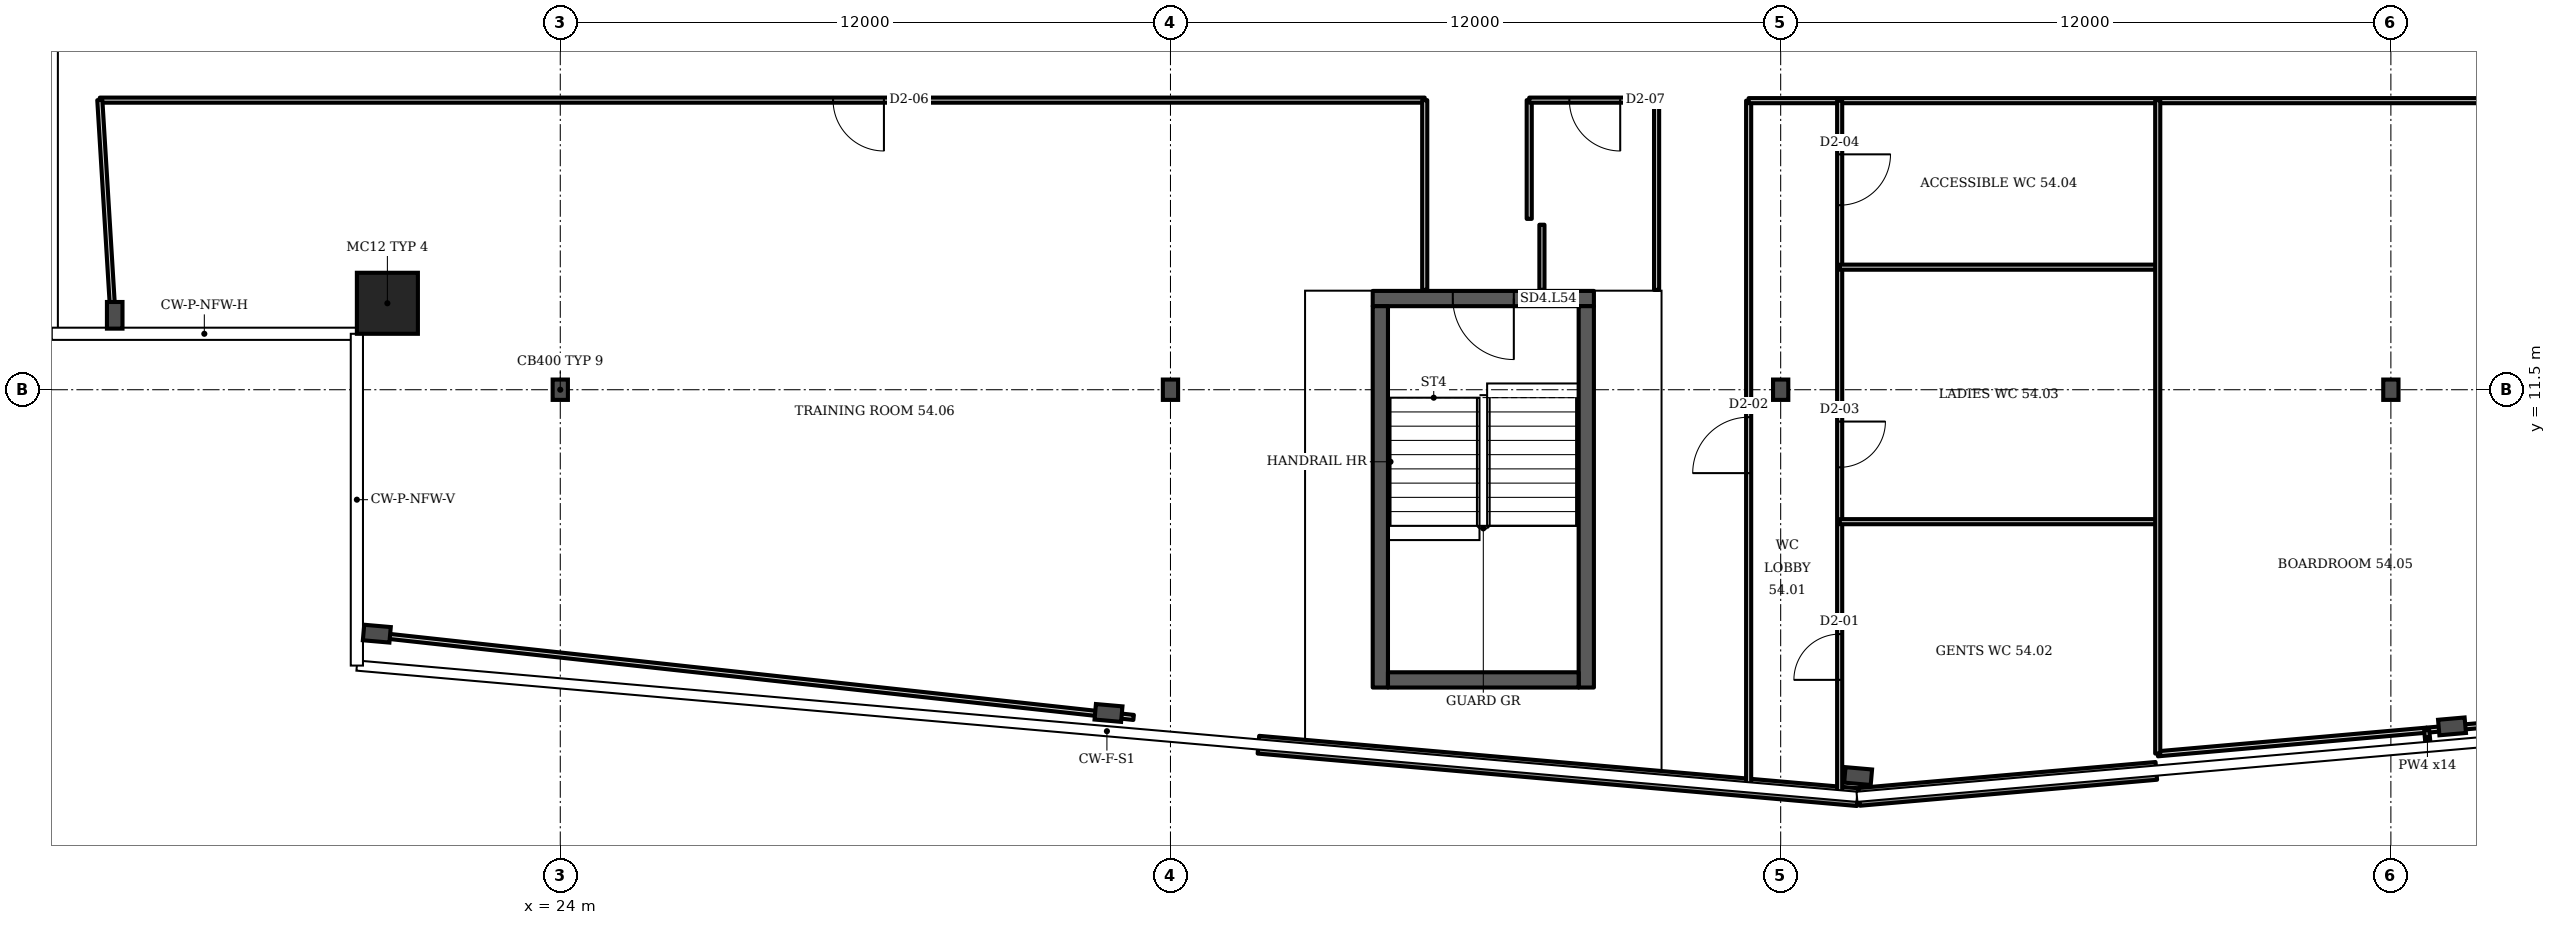
"""IFC4 building model, lengths in metres.
Left out: names, types, materials, properties, quantities, classifications, styles, units other than length and angle.
Written with IfcOpenShell. Run it as: python <this file> out.ifc"""

import sys

from ifc_helpers import new_model, si_unit, direction, frame, frame_2d, origin, origin_2d, place, context, subcontext, project, spatial, rectangle, i_section, extrude, element, fill, save


model = new_model("IFC4")
c1 = context("Model", 3, precision=1e-05, world=origin(), true_north=direction((0.0, 1.0)))
c2 = subcontext(c1, "Body", "Model", "MODEL_VIEW")
j1 = project(units=[si_unit("LENGTHUNIT", "METRE"), si_unit("PLANEANGLEUNIT", "RADIAN")], contexts=[c1])
p1 = place(None, origin())
s1 = spatial("IfcSite", under=j1, at=p1, CompositionType="ELEMENT")
p2 = place(p1, origin())
s2 = spatial("IfcBuilding", under=s1, at=p2, CompositionType="ELEMENT")
p3 = place(p2, frame((0.0, 0.0, 217.9)))
s3 = spatial("IfcBuildingStorey", under=s2, at=p3, CompositionType="ELEMENT", Elevation=217.9)
p4 = place(p3, frame((20.6, 13.2, 0.0), z_axis=(0.0, 0.0, 1.0), x_axis=(1.0, 0.0, 0.0)))
e1 = element("IfcColumn", 1, at=p4, inside=s3, PredefinedType="COLUMN", context=c2, shape_type="SweptSolid", body=[
    extrude(rectangle(XDim=1.2, YDim=1.2, at=origin_2d()), origin(), (0.0, 0.0, 1.0), 3.6),
])
for number, where, z_axis, x_axis in (
    (2, (20.392, 6.703, 0.0), (0.0, 0.0, 1.0), (-0.087, -0.996, 0.0)),
    (3, (34.781, 5.143, 0.0), (0.0, 0.0, 1.0), (-0.087, -0.996, 0.0)),
    (4, (49.523, 3.902, 0.0), (0.0, 0.0, 1.0), (-0.087, -0.996, 0.0)),
    (5, (61.202, 4.879, 0.0), (0.0, 0.0, 1.0), (0.087, -0.996, 0.0)),
    (6, (15.238, 12.963, 0.0), (0.0, 0.0, 1.0), (-1.0, 0.0, 0.0)),
):
    element("IfcColumn", number, at=place(p3, frame(where, z_axis=z_axis, x_axis=x_axis)), inside=s3, PredefinedType="COLUMN", context=c2, shape_type="SweptSolid", body=[
        extrude(i_section(OverallWidth=0.306, OverallDepth=0.524, WebThickness=0.021, FlangeThickness=0.04, FilletRadius=0.027, at=origin_2d()), origin(), (0.0, 0.0, 1.0), 3.6),
    ])
for number, where, z_axis, x_axis in (
    (7, (24.0, 11.5, 0.0), (0.0, 0.0, 1.0), (1.0, 0.0, 0.0)),
    (8, (36.0, 11.5, 0.0), (0.0, 0.0, 1.0), (1.0, 0.0, 0.0)),
    (9, (48.0, 11.5, 0.0), (0.0, 0.0, 1.0), (1.0, 0.0, 0.0)),
    (10, (60.0, 11.5, 0.0), (0.0, 0.0, 1.0), (1.0, 0.0, 0.0)),
):
    element("IfcColumn", number, at=place(p3, frame(where, z_axis=z_axis, x_axis=x_axis)), inside=s3, PredefinedType="COLUMN", context=c2, shape_type="SweptSolid", body=[
        extrude(i_section(OverallWidth=0.3, OverallDepth=0.4, WebThickness=0.013, FlangeThickness=0.024, FilletRadius=0.027, at=origin_2d()), origin(), (0.0, 0.0, 1.0), 3.6),
    ])
p5 = place(p3, frame((37.729, 4.519, 0.0), z_axis=(0.0, 0.0, 1.0), x_axis=(0.99619, -0.087167, 0.0)))
e11 = element("IfcWall", 11, at=p5, inside=s3, PredefinedType="SOLIDWALL", context=c2, shape_type="SweptSolid", body=[
    extrude(rectangle(XDim=11.831, YDim=0.35, at=frame_2d((5.915, 0.0))), origin(), (0.0, 0.0, 1.0), 1.0),
])
p6 = place(p3, frame((49.545, 3.493, 0.0), z_axis=(0.0, 0.0, 1.0), x_axis=(0.996196, 0.087138, 0.0)))
e12 = element("IfcWall", 12, at=p6, inside=s3, PredefinedType="SOLIDWALL", context=c2, shape_type="SweptSolid", body=[
    extrude(rectangle(XDim=5.864, YDim=0.35, at=frame_2d((2.932, 0.0))), origin(), (0.0, 0.0, 1.0), 1.0),
])
p7 = place(p3, frame((39.977, 13.293, 0.0), z_axis=(0.0, 0.0, 1.0), x_axis=(1.0, 0.0, 0.0)))
e13 = element("IfcWall", 13, at=p7, inside=s3, PredefinedType="SHEAR", context=c2, shape_type="SweptSolid", body=[
    extrude(rectangle(XDim=4.35, YDim=0.3, at=frame_2d((2.175, 0.0))), origin(), (0.0, 0.0, 1.0), 3.2),
])
p8 = place(p7, frame((1.575, 0.0, 0.0)))
e14 = element("IfcOpeningElement", 14, at=p8, cuts=e13, PredefinedType="OPENING", context=c2, shape_type="SweptSolid", body=[
    extrude(rectangle(XDim=1.2, YDim=2.1, at=frame_2d((0.6, 1.05))), frame((0.0, 0.16, 0.0), z_axis=(0.0, -1.0, 0.0), x_axis=(1.0, 0.0, 0.0)), (0.0, 0.0, 1.0), 0.32),
])
p9 = place(p3, frame((14.945, 17.195, 0.0), z_axis=(0.0, 0.0, 1.0), x_axis=(1.0, 0.0, 0.0)))
e15 = element("IfcWall", 15, at=p9, inside=s3, PredefinedType="PARTITIONING", context=c2, shape_type="SweptSolid", body=[
    extrude(rectangle(XDim=26.055, YDim=0.1, at=frame_2d((13.027, 0.0))), origin(), (0.0, 0.0, 1.0), 3.2),
])
p10 = place(p9, frame((14.42, 0.0, 0.0)))
e16 = element("IfcOpeningElement", 16, at=p10, cuts=e15, PredefinedType="OPENING", context=c2, shape_type="SweptSolid", body=[
    extrude(rectangle(XDim=1.0, YDim=2.1, at=frame_2d((0.5, 1.05))), frame((0.0, 0.06, 0.0), z_axis=(0.0, -1.0, 0.0), x_axis=(1.0, 0.0, 0.0)), (0.0, 0.0, 1.0), 0.12),
])
p11 = place(p3, frame((15.224, 12.62, 0.0), z_axis=(0.0, 0.0, 1.0), x_axis=(-0.060903, 0.99814, 0.0)))
e17 = element("IfcWall", 17, at=p11, inside=s3, PredefinedType="PARTITIONING", context=c2, shape_type="SweptSolid", body=[
    extrude(rectangle(XDim=4.586, YDim=0.1, at=frame_2d((2.293, 0.0))), origin(), (0.0, 0.0, 1.0), 3.2),
])
p12 = place(p3, frame((35.275, 5.055, 0.0), z_axis=(0.0, 0.0, 1.0), x_axis=(-0.994128, 0.108228, 0.0)))
e18 = element("IfcWall", 18, at=p12, inside=s3, PredefinedType="PARTITIONING", context=c2, shape_type="SweptSolid", body=[
    extrude(rectangle(XDim=15.335, YDim=0.1, at=frame_2d((7.667, 0.0))), origin(), (0.0, 0.0, 1.0), 2.58),
])
p13 = place(p3, frame((41.0, 13.463, 0.0), z_axis=(0.0, 0.0, 1.0), x_axis=(0.0, 1.0, 0.0)))
e19 = element("IfcWall", 19, at=p13, inside=s3, PredefinedType="PARTITIONING", context=c2, shape_type="SweptSolid", body=[
    extrude(rectangle(XDim=3.732, YDim=0.1, at=frame_2d((1.866, 0.0))), origin(), (0.0, 0.0, 1.0), 3.2),
])
p14 = place(p3, frame((43.055, 14.86, 0.0), z_axis=(0.0, 0.0, 1.0), x_axis=(0.0, 1.0, 0.0)))
e20 = element("IfcWall", 20, at=p14, inside=s3, PredefinedType="PARTITIONING", context=c2, shape_type="SweptSolid", body=[
    extrude(rectangle(XDim=2.335, YDim=0.1, at=frame_2d((1.167, 0.0))), origin(), (0.0, 0.0, 1.0), 3.2),
])
p15 = place(p3, frame((43.055, 17.195, 0.0), z_axis=(0.0, 0.0, 1.0), x_axis=(1.0, 0.0, 0.0)))
e21 = element("IfcWall", 21, at=p15, inside=s3, PredefinedType="PARTITIONING", context=c2, shape_type="SweptSolid", body=[
    extrude(rectangle(XDim=2.505, YDim=0.1, at=frame_2d((1.252, 0.0))), origin(), (0.0, 0.0, 1.0), 3.2),
])
p16 = place(p15, frame((0.789, 0.0, 0.0)))
e22 = element("IfcOpeningElement", 22, at=p16, cuts=e21, PredefinedType="OPENING", context=c2, shape_type="SweptSolid", body=[
    extrude(rectangle(XDim=1.0, YDim=2.1, at=frame_2d((0.5, 1.05))), frame((0.0, 0.06, 0.0), z_axis=(0.0, -1.0, 0.0), x_axis=(1.0, 0.0, 0.0)), (0.0, 0.0, 1.0), 0.12),
])
p17 = place(p3, frame((43.305, 13.463, 0.0), z_axis=(0.0, 0.0, 1.0), x_axis=(0.0, 1.0, 0.0)))
e23 = element("IfcWall", 23, at=p17, inside=s3, PredefinedType="PARTITIONING", context=c2, shape_type="SweptSolid", body=[
    extrude(rectangle(XDim=1.282, YDim=0.1, at=frame_2d((0.641, 0.0))), origin(), (0.0, 0.0, 1.0), 3.2),
])
p18 = place(p3, frame((45.56, 13.463, 0.0), z_axis=(0.0, 0.0, 1.0), x_axis=(0.0, 1.0, 0.0)))
e24 = element("IfcWall", 24, at=p18, inside=s3, PredefinedType="PARTITIONING", context=c2, shape_type="SweptSolid", body=[
    extrude(rectangle(XDim=3.732, YDim=0.1, at=frame_2d((1.866, 0.0))), origin(), (0.0, 0.0, 1.0), 3.2),
])
p19 = place(p3, frame((47.37, 3.701, 0.0), z_axis=(0.0, 0.0, 1.0), x_axis=(0.0, 1.0, 0.0)))
e25 = element("IfcWall", 25, at=p19, inside=s3, PredefinedType="PARTITIONING", context=c2, shape_type="SweptSolid", body=[
    extrude(rectangle(XDim=13.484, YDim=0.1, at=frame_2d((6.742, 0.0))), origin(), (0.0, 0.0, 1.0), 2.58),
])
p20 = place(p19, frame((6.159, 0.0, 0.0)))
e26 = element("IfcOpeningElement", 26, at=p20, cuts=e25, PredefinedType="OPENING", context=c2, shape_type="SweptSolid", body=[
    extrude(rectangle(XDim=1.1, YDim=2.1, at=frame_2d((0.55, 1.05))), frame((0.0, 0.06, 0.0), z_axis=(0.0, -1.0, 0.0), x_axis=(1.0, 0.0, 0.0)), (0.0, 0.0, 1.0), 0.12),
])
p21 = place(p3, frame((47.37, 17.185, 0.0), z_axis=(0.0, 0.0, 1.0), x_axis=(1.0, 0.0, 0.0)))
e27 = element("IfcWall", 27, at=p21, inside=s3, PredefinedType="PARTITIONING", context=c2, shape_type="SweptSolid", body=[
    extrude(rectangle(XDim=17.75, YDim=0.1, at=frame_2d((8.875, 0.0))), origin(), (0.0, 0.0, 1.0), 3.2),
])
p22 = place(p3, frame((49.16, 3.544, 0.0), z_axis=(0.0, 0.0, 1.0), x_axis=(0.0, 1.0, 0.0)))
e28 = element("IfcWall", 28, at=p22, inside=s3, PredefinedType="PARTITIONING", context=c2, shape_type="SweptSolid", body=[
    extrude(rectangle(XDim=13.641, YDim=0.1, at=frame_2d((6.821, 0.0))), origin(), (0.0, 0.0, 1.0), 2.58),
])
p23 = place(p22, frame((2.25, 0.0, 0.0)))
e29 = element("IfcOpeningElement", 29, at=p23, cuts=e28, PredefinedType="OPENING", context=c2, shape_type="SweptSolid", body=[
    extrude(rectangle(XDim=0.9, YDim=2.1, at=frame_2d((0.45, 1.05))), frame((0.0, 0.06, 0.0), z_axis=(0.0, -1.0, 0.0), x_axis=(1.0, 0.0, 0.0)), (0.0, 0.0, 1.0), 0.12),
])
p24 = place(p22, frame((6.43, 0.0, 0.0)))
e30 = element("IfcOpeningElement", 30, at=p24, cuts=e28, PredefinedType="OPENING", context=c2, shape_type="SweptSolid", body=[
    extrude(rectangle(XDim=0.9, YDim=2.1, at=frame_2d((0.45, 1.05))), frame((0.0, 0.06, 0.0), z_axis=(0.0, -1.0, 0.0), x_axis=(1.0, 0.0, 0.0)), (0.0, 0.0, 1.0), 0.12),
])
p25 = place(p22, frame((11.585, 0.0, 0.0)))
e31 = element("IfcOpeningElement", 31, at=p25, cuts=e28, PredefinedType="OPENING", context=c2, shape_type="SweptSolid", body=[
    extrude(rectangle(XDim=1.0, YDim=2.1, at=frame_2d((0.5, 1.05))), frame((0.0, 0.06, 0.0), z_axis=(0.0, -1.0, 0.0), x_axis=(1.0, 0.0, 0.0)), (0.0, 0.0, 1.0), 0.12),
])
for number, where, z_axis, x_axis in (
    (32, (49.16, 8.905, 0.0), (0.0, 0.0, 1.0), (1.0, 0.0, 0.0)),
    (33, (49.16, 13.91, 0.0), (0.0, 0.0, 1.0), (1.0, 0.0, 0.0)),
):
    element("IfcWall", number, at=place(p3, frame(where, z_axis=z_axis, x_axis=x_axis)), inside=s3, PredefinedType="PARTITIONING", context=c2, shape_type="SweptSolid", body=[
        extrude(rectangle(XDim=6.255, YDim=0.1, at=frame_2d((3.127, 0.0))), origin(), (0.0, 0.0, 1.0), 3.2),
    ])
p26 = place(p3, frame((55.415, 4.34, 0.0), z_axis=(0.0, 0.0, 1.0), x_axis=(0.996159, 0.087534, 0.0)))
e34 = element("IfcWall", 34, at=p26, inside=s3, PredefinedType="PARTITIONING", context=c2, shape_type="SweptSolid", body=[
    extrude(rectangle(XDim=5.31, YDim=0.1, at=frame_2d((2.655, 0.0))), origin(), (0.0, 0.0, 1.0), 2.58),
])
p27 = place(p3, frame((55.415, 4.345, 0.0), z_axis=(0.0, 0.0, 1.0), x_axis=(0.0, 1.0, 0.0)))
e35 = element("IfcWall", 35, at=p27, inside=s3, PredefinedType="PARTITIONING", context=c2, shape_type="SweptSolid", body=[
    extrude(rectangle(XDim=12.85, YDim=0.1, at=frame_2d((6.425, 0.0))), origin(), (0.0, 0.0, 1.0), 3.2),
])
p28 = place(p3, frame((60.705, 4.805, 0.0), z_axis=(0.0, 0.0, 1.0), x_axis=(0.996324, 0.085692, 0.0)))
e36 = element("IfcWall", 36, at=p28, inside=s3, PredefinedType="PARTITIONING", context=c2, shape_type="SweptSolid", body=[
    extrude(rectangle(XDim=2.955, YDim=0.1, at=frame_2d((1.477, 0.0))), origin(), (0.0, 0.0, 1.0), 2.58),
])
p29 = place(p3, frame((60.733, 4.497, 0.0), z_axis=(0.0, 0.0, 1.0), x_axis=(-0.090037, 0.995936, 0.0)))
e37 = element("IfcWall", 37, at=p29, inside=s3, PredefinedType="PARTITIONING", context=c2, shape_type="SweptSolid", body=[
    extrude(rectangle(XDim=0.309, YDim=0.1, at=frame_2d((0.155, 0.0))), origin(), (0.0, 0.0, 1.0), 3.2),
])
for number, where, z_axis, x_axis in (
    (38, (40.127, 5.643, 0.0), (0.0, 0.0, 1.0), (0.0, 1.0, 0.0)),
    (39, (44.177, 5.643, 0.0), (0.0, 0.0, 1.0), (0.0, 1.0, 0.0)),
):
    element("IfcWall", number, at=place(p3, frame(where, z_axis=z_axis, x_axis=x_axis)), inside=s3, PredefinedType="SHEAR", context=c2, shape_type="SweptSolid", body=[
        extrude(rectangle(XDim=7.5, YDim=0.3, at=frame_2d((3.75, 0.0))), origin(), (0.0, 0.0, 1.0), 3.2),
    ])
p30 = place(p3, frame((40.277, 5.793, 0.0), z_axis=(0.0, 0.0, 1.0), x_axis=(1.0, 0.0, 0.0)))
e40 = element("IfcWall", 40, at=p30, inside=s3, PredefinedType="SHEAR", context=c2, shape_type="SweptSolid", body=[
    extrude(rectangle(XDim=3.75, YDim=0.3, at=frame_2d((1.875, 0.0))), origin(), (0.0, 0.0, 1.0), 3.2),
])
p31 = place(p8, origin())
e41 = element("IfcDoor", 41, at=p31, inside=s3, OperationType="SINGLE_SWING_RIGHT", PredefinedType="DOOR", context=c2, shape_type="SweptSolid", body=[
    extrude(rectangle(XDim=1.2, YDim=2.1, at=frame_2d((0.6, 1.05))), frame((0.0, 0.025, 0.0), z_axis=(0.0, -1.0, 0.0), x_axis=(1.0, 0.0, 0.0)), (0.0, 0.0, 1.0), 0.05),
])
fill(e14, e41)
p32 = place(p23, origin())
e42 = element("IfcDoor", 42, at=p32, inside=s3, OperationType="SINGLE_SWING_LEFT", PredefinedType="DOOR", context=c2, shape_type="SweptSolid", body=[
    extrude(rectangle(XDim=0.9, YDim=2.1, at=frame_2d((0.45, 1.05))), frame((0.0, 0.025, 0.0), z_axis=(0.0, -1.0, 0.0), x_axis=(1.0, 0.0, 0.0)), (0.0, 0.0, 1.0), 0.05),
])
fill(e29, e42)
p33 = place(p20, origin())
e43 = element("IfcDoor", 43, at=p33, inside=s3, OperationType="SINGLE_SWING_LEFT", PredefinedType="DOOR", context=c2, shape_type="SweptSolid", body=[
    extrude(rectangle(XDim=1.1, YDim=2.1, at=frame_2d((0.55, 1.05))), frame((0.0, 0.025, 0.0), z_axis=(0.0, -1.0, 0.0), x_axis=(1.0, 0.0, 0.0)), (0.0, 0.0, 1.0), 0.05),
])
fill(e26, e43)
p34 = place(p24, origin())
e44 = element("IfcDoor", 44, at=p34, inside=s3, OperationType="SINGLE_SWING_RIGHT", PredefinedType="DOOR", context=c2, shape_type="SweptSolid", body=[
    extrude(rectangle(XDim=0.9, YDim=2.1, at=frame_2d((0.45, 1.05))), frame((0.0, 0.025, 0.0), z_axis=(0.0, -1.0, 0.0), x_axis=(1.0, 0.0, 0.0)), (0.0, 0.0, 1.0), 0.05),
])
fill(e30, e44)
p35 = place(p25, origin())
e45 = element("IfcDoor", 45, at=p35, inside=s3, OperationType="SINGLE_SWING_RIGHT", PredefinedType="DOOR", context=c2, shape_type="SweptSolid", body=[
    extrude(rectangle(XDim=1.0, YDim=2.1, at=frame_2d((0.5, 1.05))), frame((0.0, 0.025, 0.0), z_axis=(0.0, -1.0, 0.0), x_axis=(1.0, 0.0, 0.0)), (0.0, 0.0, 1.0), 0.05),
])
fill(e31, e45)
p36 = place(p10, origin())
e46 = element("IfcDoor", 46, at=p36, inside=s3, OperationType="SINGLE_SWING_RIGHT", PredefinedType="DOOR", context=c2, shape_type="SweptSolid", body=[
    extrude(rectangle(XDim=1.0, YDim=2.1, at=frame_2d((0.5, 1.05))), frame((0.0, 0.025, 0.0), z_axis=(0.0, -1.0, 0.0), x_axis=(1.0, 0.0, 0.0)), (0.0, 0.0, 1.0), 0.05),
])
fill(e16, e46)
p37 = place(p16, origin())
e47 = element("IfcDoor", 47, at=p37, inside=s3, OperationType="SINGLE_SWING_RIGHT", PredefinedType="DOOR", context=c2, shape_type="SweptSolid", body=[
    extrude(rectangle(XDim=1.0, YDim=2.1, at=frame_2d((0.5, 1.05))), frame((0.0, 0.025, 0.0), z_axis=(0.0, -1.0, 0.0), x_axis=(1.0, 0.0, 0.0)), (0.0, 0.0, 1.0), 0.05),
])
fill(e22, e47)
save(model, sys.argv[1])
